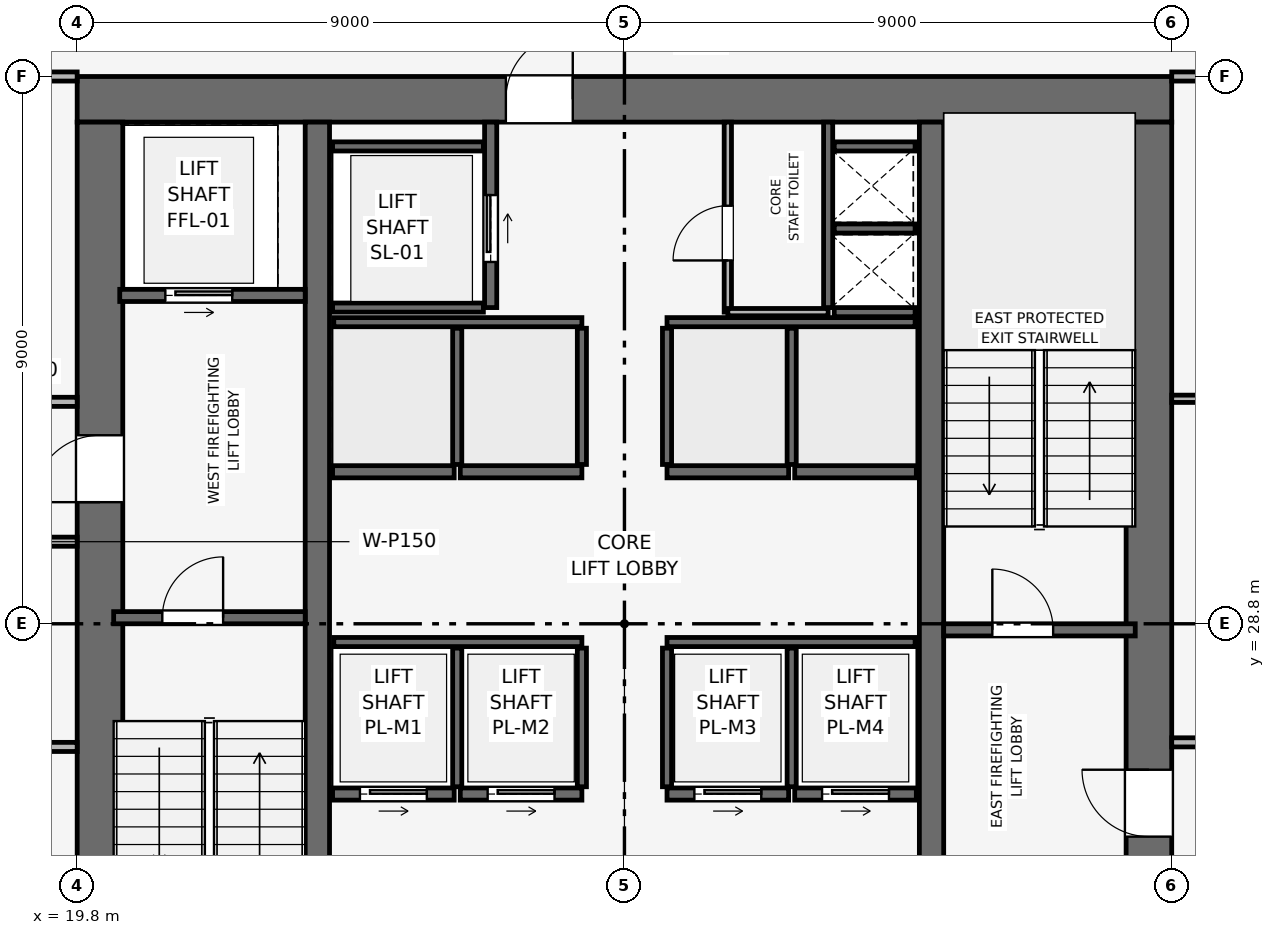
"""IFC4 building model, lengths in metres.
Left out: names, types, materials, properties, quantities, classifications, styles, units other than length and angle.
Written with IfcOpenShell. Run it as: python <this file> out.ifc"""

import sys

from ifc_helpers import new_model, si_unit, direction, frame, frame_2d, origin, place, context, subcontext, project, spatial, rectangle, extrude, element, fill, save


model = new_model("IFC4")
c1 = context("Model", 3, precision=1e-05, world=origin(), true_north=direction((0.0, 1.0)))
c2 = subcontext(c1, "Body", "Model", "MODEL_VIEW")
j1 = project(units=[si_unit("LENGTHUNIT", "METRE"), si_unit("PLANEANGLEUNIT", "RADIAN")], contexts=[c1])
p1 = place(None, origin())
s1 = spatial("IfcSite", under=j1, at=p1, CompositionType="ELEMENT")
p2 = place(p1, origin())
s2 = spatial("IfcBuilding", under=s1, at=p2, CompositionType="ELEMENT")
p3 = place(p2, frame((0.0, 0.0, 207.45)))
s3 = spatial("IfcBuildingStorey", under=s2, at=p3, CompositionType="ELEMENT", Elevation=207.45)
p4 = place(p3, frame((19.8, 37.425, 0.0), z_axis=(0.0, 0.0, 1.0), x_axis=(1.0, 0.0, 0.0)))
e1 = element("IfcWall", 1, at=p4, inside=s3, PredefinedType="SHEAR", context=c2, shape_type="SweptSolid", body=[
    extrude(rectangle(XDim=18.0, YDim=0.75, at=frame_2d((9.0, 0.0))), origin(), (0.0, 0.0, 1.0), 3.75),
])
p5 = place(p4, frame((7.05, 0.0, 0.0)))
e2 = element("IfcOpeningElement", 2, at=p5, cuts=e1, PredefinedType="OPENING", context=c2, shape_type="SweptSolid", body=[
    extrude(rectangle(XDim=1.1, YDim=2.15, at=frame_2d((0.55, 1.075))), frame((0.0, 0.385, 0.0), z_axis=(0.0, -1.0, 0.0), x_axis=(1.0, 0.0, 0.0)), (0.0, 0.0, 1.0), 0.77),
])
p6 = place(p3, frame((20.175, 20.55, 0.0), z_axis=(0.0, 0.0, 1.0), x_axis=(0.0, 1.0, 0.0)))
e3 = element("IfcWall", 3, at=p6, inside=s3, PredefinedType="SHEAR", context=c2, shape_type="SweptSolid", body=[
    extrude(rectangle(XDim=16.5, YDim=0.75, at=frame_2d((8.25, 0.0))), origin(), (0.0, 0.0, 1.0), 3.75),
])
p7 = place(p6, frame((10.25, 0.0, 0.0)))
e4 = element("IfcOpeningElement", 4, at=p7, cuts=e3, PredefinedType="OPENING", context=c2, shape_type="SweptSolid", body=[
    extrude(rectangle(XDim=1.1, YDim=2.15, at=frame_2d((0.55, 1.075))), frame((0.0, 0.385, 0.0), z_axis=(0.0, -1.0, 0.0), x_axis=(1.0, 0.0, 0.0)), (0.0, 0.0, 1.0), 0.77),
])
p8 = place(p3, frame((37.425, 20.55, 0.0), z_axis=(0.0, 0.0, 1.0), x_axis=(0.0, 1.0, 0.0)))
e5 = element("IfcWall", 5, at=p8, inside=s3, PredefinedType="SHEAR", context=c2, shape_type="SweptSolid", body=[
    extrude(rectangle(XDim=16.5, YDim=0.75, at=frame_2d((8.25, 0.0))), origin(), (0.0, 0.0, 1.0), 3.75),
])
p9 = place(p8, frame((4.75, 0.0, 0.0)))
e6 = element("IfcOpeningElement", 6, at=p9, cuts=e5, PredefinedType="OPENING", context=c2, shape_type="SweptSolid", body=[
    extrude(rectangle(XDim=1.1, YDim=2.15, at=frame_2d((0.55, 1.075))), frame((0.0, 0.385, 0.0), z_axis=(0.0, -1.0, 0.0), x_axis=(1.0, 0.0, 0.0)), (0.0, 0.0, 1.0), 0.77),
])
for number, where, z_axis, x_axis in (
    (7, (23.75, 20.55, 0.0), (0.0, 0.0, 1.0), (0.0, 1.0, 0.0)),
    (8, (33.85, 20.55, 0.0), (0.0, 0.0, 1.0), (0.0, 1.0, 0.0)),
):
    element("IfcWall", number, at=place(p3, frame(where, z_axis=z_axis, x_axis=x_axis)), inside=s3, PredefinedType="SHEAR", context=c2, shape_type="SweptSolid", body=[
        extrude(rectangle(XDim=16.5, YDim=0.4, at=frame_2d((8.25, 0.0))), origin(), (0.0, 0.0, 1.0), 3.75),
    ])
p10 = place(p3, frame((20.4, 28.9, 0.0), z_axis=(0.0, 0.0, 1.0), x_axis=(1.0, 0.0, 0.0)))
e9 = element("IfcWall", 9, at=p10, inside=s3, PredefinedType="SHEAR", context=c2, shape_type="SweptSolid", body=[
    extrude(rectangle(XDim=3.15, YDim=0.2, at=frame_2d((1.575, 0.0))), origin(), (0.0, 0.0, 1.0), 3.5),
])
p11 = place(p10, frame((0.8, 0.0, 0.0)))
e10 = element("IfcOpeningElement", 10, at=p11, cuts=e9, PredefinedType="OPENING", context=c2, shape_type="SweptSolid", body=[
    extrude(rectangle(XDim=1.0, YDim=2.1, at=frame_2d((0.5, 1.05))), frame((0.0, 0.11, 0.0), z_axis=(0.0, -1.0, 0.0), x_axis=(1.0, 0.0, 0.0)), (0.0, 0.0, 1.0), 0.22),
])
p12 = place(p3, frame((34.05, 28.7, 0.0), z_axis=(0.0, 0.0, 1.0), x_axis=(1.0, 0.0, 0.0)))
e11 = element("IfcWall", 11, at=p12, inside=s3, PredefinedType="SHEAR", context=c2, shape_type="SweptSolid", body=[
    extrude(rectangle(XDim=3.15, YDim=0.2, at=frame_2d((1.575, 0.0))), origin(), (0.0, 0.0, 1.0), 3.5),
])
p13 = place(p12, frame((0.8, 0.0, 0.0)))
e12 = element("IfcOpeningElement", 12, at=p13, cuts=e11, PredefinedType="OPENING", context=c2, shape_type="SweptSolid", body=[
    extrude(rectangle(XDim=1.0, YDim=2.1, at=frame_2d((0.5, 1.05))), frame((0.0, 0.11, 0.0), z_axis=(0.0, -1.0, 0.0), x_axis=(1.0, 0.0, 0.0)), (0.0, 0.0, 1.0), 0.22),
])
p14 = place(p3, frame((32.15, 34.0, 0.0), z_axis=(0.0, 0.0, 1.0), x_axis=(0.0, 1.0, 0.0)))
e13 = element("IfcWall", 13, at=p14, inside=s3, PredefinedType="SHEAR", context=c2, shape_type="SweptSolid", body=[
    extrude(rectangle(XDim=3.05, YDim=0.15, at=frame_2d((1.525, 0.0))), origin(), (0.0, 0.0, 1.0), 3.5),
])
for number, where, z_axis, x_axis in (
    (14, (32.25, 33.925, 0.0), (0.0, 0.0, 1.0), (1.0, 0.0, 0.0)),
    (15, (32.25, 35.3, 0.0), (0.0, 0.0, 1.0), (1.0, 0.0, 0.0)),
):
    element("IfcWall", number, at=place(p3, frame(where, z_axis=z_axis, x_axis=x_axis)), inside=s3, PredefinedType="SHEAR", context=c2, shape_type="SweptSolid", body=[
        extrude(rectangle(XDim=1.33, YDim=0.15, at=frame_2d((0.665, 0.0))), origin(), (0.0, 0.0, 1.0), 3.5),
    ])
p15 = place(p3, frame((20.5, 34.2, 0.0), z_axis=(0.0, 0.0, 1.0), x_axis=(1.0, 0.0, 0.0)))
e16 = element("IfcWall", 16, at=p15, inside=s3, PredefinedType="SHEAR", context=c2, shape_type="SweptSolid", body=[
    extrude(rectangle(XDim=3.05, YDim=0.2, at=frame_2d((1.525, 0.0))), origin(), (0.0, 0.0, 1.0), 3.5),
])
p16 = place(p15, frame((0.75, 0.0, 0.0)))
e17 = element("IfcOpeningElement", 17, at=p16, cuts=e16, PredefinedType="OPENING", context=c2, shape_type="SweptSolid", body=[
    extrude(rectangle(XDim=1.1, YDim=2.15, at=frame_2d((0.55, 1.075))), frame((0.0, 0.11, 0.0), z_axis=(0.0, -1.0, 0.0), x_axis=(1.0, 0.0, 0.0)), (0.0, 0.0, 1.0), 0.22),
])
p17 = place(p3, frame((26.6, 34.0, 0.0), z_axis=(0.0, 0.0, 1.0), x_axis=(0.0, 1.0, 0.0)))
e18 = element("IfcWall", 18, at=p17, inside=s3, PredefinedType="SHEAR", context=c2, shape_type="SweptSolid", body=[
    extrude(rectangle(XDim=3.05, YDim=0.2, at=frame_2d((1.525, 0.0))), origin(), (0.0, 0.0, 1.0), 3.5),
])
p18 = place(p17, frame((0.75, 0.0, 0.0)))
e19 = element("IfcOpeningElement", 19, at=p18, cuts=e18, PredefinedType="OPENING", context=c2, shape_type="SweptSolid", body=[
    extrude(rectangle(XDim=1.1, YDim=2.15, at=frame_2d((0.55, 1.075))), frame((0.0, 0.11, 0.0), z_axis=(0.0, -1.0, 0.0), x_axis=(1.0, 0.0, 0.0)), (0.0, 0.0, 1.0), 0.22),
])
for number, where, z_axis, x_axis in (
    (20, (24.0, 34.0, 0.0), (0.0, 0.0, 1.0), (1.0, 0.0, 0.0)),
    (21, (24.0, 36.65, 0.0), (0.0, 0.0, 1.0), (1.0, 0.0, 0.0)),
):
    element("IfcWall", number, at=place(p3, frame(where, z_axis=z_axis, x_axis=x_axis)), inside=s3, PredefinedType="SHEAR", context=c2, shape_type="SweptSolid", body=[
        extrude(rectangle(XDim=2.48, YDim=0.15, at=frame_2d((1.24, 0.0))), origin(), (0.0, 0.0, 1.0), 3.5),
    ])
p19 = place(p3, frame((24.0, 26.0, 0.0), z_axis=(0.0, 0.0, 1.0), x_axis=(1.0, 0.0, 0.0)))
e22 = element("IfcWall", 22, at=p19, inside=s3, PredefinedType="SHEAR", context=c2, shape_type="SweptSolid", body=[
    extrude(rectangle(XDim=2.0, YDim=0.2, at=frame_2d((1.0, 0.0))), origin(), (0.0, 0.0, 1.0), 3.5),
])
p20 = place(p19, frame((0.45, 0.0, 0.0)))
e23 = element("IfcOpeningElement", 23, at=p20, cuts=e22, PredefinedType="OPENING", context=c2, shape_type="SweptSolid", body=[
    extrude(rectangle(XDim=1.1, YDim=2.15, at=frame_2d((0.55, 1.075))), frame((0.0, 0.11, 0.0), z_axis=(0.0, -1.0, 0.0), x_axis=(1.0, 0.0, 0.0)), (0.0, 0.0, 1.0), 0.22),
])
p21 = place(p3, frame((26.1, 26.0, 0.0), z_axis=(0.0, 0.0, 1.0), x_axis=(1.0, 0.0, 0.0)))
e24 = element("IfcWall", 24, at=p21, inside=s3, PredefinedType="SHEAR", context=c2, shape_type="SweptSolid", body=[
    extrude(rectangle(XDim=2.0, YDim=0.2, at=frame_2d((1.0, 0.0))), origin(), (0.0, 0.0, 1.0), 3.5),
])
p22 = place(p21, frame((0.45, 0.0, 0.0)))
e25 = element("IfcOpeningElement", 25, at=p22, cuts=e24, PredefinedType="OPENING", context=c2, shape_type="SweptSolid", body=[
    extrude(rectangle(XDim=1.1, YDim=2.15, at=frame_2d((0.55, 1.075))), frame((0.0, 0.11, 0.0), z_axis=(0.0, -1.0, 0.0), x_axis=(1.0, 0.0, 0.0)), (0.0, 0.0, 1.0), 0.22),
])
p23 = place(p3, frame((29.5, 26.0, 0.0), z_axis=(0.0, 0.0, 1.0), x_axis=(1.0, 0.0, 0.0)))
e26 = element("IfcWall", 26, at=p23, inside=s3, PredefinedType="SHEAR", context=c2, shape_type="SweptSolid", body=[
    extrude(rectangle(XDim=2.0, YDim=0.2, at=frame_2d((1.0, 0.0))), origin(), (0.0, 0.0, 1.0), 3.5),
])
p24 = place(p23, frame((0.45, 0.0, 0.0)))
e27 = element("IfcOpeningElement", 27, at=p24, cuts=e26, PredefinedType="OPENING", context=c2, shape_type="SweptSolid", body=[
    extrude(rectangle(XDim=1.1, YDim=2.15, at=frame_2d((0.55, 1.075))), frame((0.0, 0.11, 0.0), z_axis=(0.0, -1.0, 0.0), x_axis=(1.0, 0.0, 0.0)), (0.0, 0.0, 1.0), 0.22),
])
p25 = place(p3, frame((31.6, 26.0, 0.0), z_axis=(0.0, 0.0, 1.0), x_axis=(1.0, 0.0, 0.0)))
e28 = element("IfcWall", 28, at=p25, inside=s3, PredefinedType="SHEAR", context=c2, shape_type="SweptSolid", body=[
    extrude(rectangle(XDim=2.0, YDim=0.2, at=frame_2d((1.0, 0.0))), origin(), (0.0, 0.0, 1.0), 3.5),
])
p26 = place(p25, frame((0.45, 0.0, 0.0)))
e29 = element("IfcOpeningElement", 29, at=p26, cuts=e28, PredefinedType="OPENING", context=c2, shape_type="SweptSolid", body=[
    extrude(rectangle(XDim=1.1, YDim=2.15, at=frame_2d((0.55, 1.075))), frame((0.0, 0.11, 0.0), z_axis=(0.0, -1.0, 0.0), x_axis=(1.0, 0.0, 0.0)), (0.0, 0.0, 1.0), 0.22),
])
for number, where, z_axis, x_axis in (
    (30, (24.0, 31.3, 0.0), (0.0, 0.0, 1.0), (1.0, 0.0, 0.0)),
    (31, (26.1, 31.3, 0.0), (0.0, 0.0, 1.0), (1.0, 0.0, 0.0)),
    (32, (29.5, 31.3, 0.0), (0.0, 0.0, 1.0), (1.0, 0.0, 0.0)),
    (33, (31.6, 31.3, 0.0), (0.0, 0.0, 1.0), (1.0, 0.0, 0.0)),
):
    element("IfcWall", number, at=place(p3, frame(where, z_axis=z_axis, x_axis=x_axis)), inside=s3, PredefinedType="SHEAR", context=c2, shape_type="SweptSolid", body=[
        extrude(rectangle(XDim=2.0, YDim=0.2, at=frame_2d((1.0, 0.0))), origin(), (0.0, 0.0, 1.0), 3.5),
    ])
p27 = place(p3, frame((32.25, 36.65, 0.0), z_axis=(0.0, 0.0, 1.0), x_axis=(1.0, 0.0, 0.0)))
e34 = element("IfcWall", 34, at=p27, inside=s3, PredefinedType="SHEAR", context=c2, shape_type="SweptSolid", body=[
    extrude(rectangle(XDim=1.33, YDim=0.15, at=frame_2d((0.665, 0.0))), origin(), (0.0, 0.0, 1.0), 3.5),
])
for number, where, z_axis, x_axis in (
    (35, (24.02, 28.5, 0.0), (0.0, 0.0, 1.0), (1.0, 0.0, 0.0)),
    (36, (29.5, 28.5, 0.0), (0.0, 0.0, 1.0), (1.0, 0.0, 0.0)),
):
    element("IfcWall", number, at=place(p3, frame(where, z_axis=z_axis, x_axis=x_axis)), inside=s3, PredefinedType="SHEAR", context=c2, shape_type="SweptSolid", body=[
        extrude(rectangle(XDim=4.08, YDim=0.15, at=frame_2d((2.04, 0.0))), origin(), (0.0, 0.0, 1.0), 3.5),
    ])
for number, where, z_axis, x_axis in (
    (37, (26.05, 26.12, 0.0), (0.0, 0.0, 1.0), (0.0, 1.0, 0.0)),
    (38, (28.1, 26.12, 0.0), (0.0, 0.0, 1.0), (0.0, 1.0, 0.0)),
    (39, (29.5, 26.12, 0.0), (0.0, 0.0, 1.0), (0.0, 1.0, 0.0)),
    (40, (31.55, 26.12, 0.0), (0.0, 0.0, 1.0), (0.0, 1.0, 0.0)),
):
    element("IfcWall", number, at=place(p3, frame(where, z_axis=z_axis, x_axis=x_axis)), inside=s3, PredefinedType="SHEAR", context=c2, shape_type="SweptSolid", body=[
        extrude(rectangle(XDim=2.28, YDim=0.15, at=frame_2d((1.14, 0.0))), origin(), (0.0, 0.0, 1.0), 3.5),
    ])
for number, where, z_axis, x_axis in (
    (41, (24.02, 33.76, 0.0), (0.0, 0.0, 1.0), (1.0, 0.0, 0.0)),
    (42, (29.5, 33.76, 0.0), (0.0, 0.0, 1.0), (1.0, 0.0, 0.0)),
):
    element("IfcWall", number, at=place(p3, frame(where, z_axis=z_axis, x_axis=x_axis)), inside=s3, PredefinedType="SHEAR", context=c2, shape_type="SweptSolid", body=[
        extrude(rectangle(XDim=4.08, YDim=0.15, at=frame_2d((2.04, 0.0))), origin(), (0.0, 0.0, 1.0), 3.5),
    ])
for number, where, z_axis, x_axis in (
    (43, (26.05, 31.42, 0.0), (0.0, 0.0, 1.0), (0.0, 1.0, 0.0)),
    (44, (28.1, 31.42, 0.0), (0.0, 0.0, 1.0), (0.0, 1.0, 0.0)),
    (45, (29.5, 31.42, 0.0), (0.0, 0.0, 1.0), (0.0, 1.0, 0.0)),
    (46, (31.55, 31.42, 0.0), (0.0, 0.0, 1.0), (0.0, 1.0, 0.0)),
):
    element("IfcWall", number, at=place(p3, frame(where, z_axis=z_axis, x_axis=x_axis)), inside=s3, PredefinedType="SHEAR", context=c2, shape_type="SweptSolid", body=[
        extrude(rectangle(XDim=2.24, YDim=0.15, at=frame_2d((1.12, 0.0))), origin(), (0.0, 0.0, 1.0), 3.5),
    ])
p28 = place(p3, frame((30.5, 33.925, 0.0), z_axis=(0.0, 0.0, 1.0), x_axis=(0.0, 1.0, 0.0)))
e47 = element("IfcWall", 47, at=p28, inside=s3, PredefinedType="PARTITIONING", context=c2, shape_type="SweptSolid", body=[
    extrude(rectangle(XDim=3.125, YDim=0.12, at=frame_2d((1.562, 0.0))), origin(), (0.0, 0.0, 1.0), 3.5),
])
p29 = place(p28, frame((0.85, 0.0, 0.0)))
e48 = element("IfcOpeningElement", 48, at=p29, cuts=e47, PredefinedType="OPENING", context=c2, shape_type="SweptSolid", body=[
    extrude(rectangle(XDim=0.9, YDim=2.1, at=frame_2d((0.45, 1.05))), frame((0.0, 0.07, 0.0), z_axis=(0.0, -1.0, 0.0), x_axis=(1.0, 0.0, 0.0)), (0.0, 0.0, 1.0), 0.14),
])
p30 = place(p3, frame((30.5, 33.925, 0.0), z_axis=(0.0, 0.0, 1.0), x_axis=(1.0, 0.0, 0.0)))
e49 = element("IfcWall", 49, at=p30, inside=s3, PredefinedType="PARTITIONING", context=c2, shape_type="SweptSolid", body=[
    extrude(rectangle(XDim=1.65, YDim=0.12, at=frame_2d((0.825, 0.0))), origin(), (0.0, 0.0, 1.0), 3.5),
])
for number, where, z_axis, x_axis in (
    (50, (15.4, 26.775, 0.0), (0.0, 0.0, 1.0), (1.0, 0.0, 0.0)),
    (51, (15.4, 30.15, 0.0), (0.0, 0.0, 1.0), (1.0, 0.0, 0.0)),
    (52, (15.4, 32.45, 0.0), (0.0, 0.0, 1.0), (1.0, 0.0, 0.0)),
):
    element("IfcWall", number, at=place(p3, frame(where, z_axis=z_axis, x_axis=x_axis)), inside=s3, PredefinedType="PARTITIONING", context=c2, shape_type="SweptSolid", body=[
        extrude(rectangle(XDim=4.4, YDim=0.15, at=frame_2d((2.2, 0.0))), origin(), (0.0, 0.0, 1.0), 3.5),
    ])
p31 = place(p3, frame((15.4, 37.8, 0.0), z_axis=(0.0, 0.0, 1.0), x_axis=(1.0, 0.0, 0.0)))
e53 = element("IfcWall", 53, at=p31, inside=s3, PredefinedType="PARTITIONING", context=c2, shape_type="SweptSolid", body=[
    extrude(rectangle(XDim=4.4, YDim=0.15, at=frame_2d((2.2, 0.0))), origin(), (0.0, 0.0, 1.0), 3.035),
])
p32 = place(p3, frame((37.8, 26.85, 0.0), z_axis=(0.0, 0.0, 1.0), x_axis=(1.0, 0.0, 0.0)))
e54 = element("IfcWall", 54, at=p32, inside=s3, PredefinedType="PARTITIONING", context=c2, shape_type="SweptSolid", body=[
    extrude(rectangle(XDim=2.25, YDim=0.15, at=frame_2d((1.125, 0.0))), origin(), (0.0, 0.0, 1.0), 3.5),
])
p33 = place(p3, frame((37.8, 32.5, 0.0), z_axis=(0.0, 0.0, 1.0), x_axis=(1.0, 0.0, 0.0)))
e55 = element("IfcWall", 55, at=p33, inside=s3, PredefinedType="PARTITIONING", context=c2, shape_type="SweptSolid", body=[
    extrude(rectangle(XDim=17.87, YDim=0.12, at=frame_2d((8.935, 0.0))), origin(), (0.0, 0.0, 1.0), 2.885),
])
p34 = place(p3, frame((37.8, 37.8, 0.0), z_axis=(0.0, 0.0, 1.0), x_axis=(1.0, 0.0, 0.0)))
e56 = element("IfcWall", 56, at=p34, inside=s3, PredefinedType="PARTITIONING", context=c2, shape_type="SweptSolid", body=[
    extrude(rectangle(XDim=17.87, YDim=0.15, at=frame_2d((8.935, 0.0))), origin(), (0.0, 0.0, 1.0), 2.885),
])
p35 = place(p34, frame((3.4, 0.0, 0.0)))
e57 = element("IfcOpeningElement", 57, at=p35, cuts=e56, PredefinedType="OPENING", context=c2, shape_type="SweptSolid", body=[
    extrude(rectangle(XDim=0.9, YDim=2.1, at=frame_2d((0.45, 1.05))), frame((0.0, 0.085, 0.0), z_axis=(0.0, -1.0, 0.0), x_axis=(1.0, 0.0, 0.0)), (0.0, 0.0, 1.0), 0.17),
])
p36 = place(p11, origin())
e58 = element("IfcDoor", 58, at=p36, inside=s3, OperationType="SINGLE_SWING_RIGHT", PredefinedType="DOOR", context=c2, shape_type="SweptSolid", body=[
    extrude(rectangle(XDim=1.0, YDim=2.1, at=frame_2d((0.5, 1.05))), frame((0.0, 0.025, 0.0), z_axis=(0.0, -1.0, 0.0), x_axis=(1.0, 0.0, 0.0)), (0.0, 0.0, 1.0), 0.05),
])
fill(e10, e58)
p37 = place(p13, origin())
e59 = element("IfcDoor", 59, at=p37, inside=s3, OperationType="SINGLE_SWING_LEFT", PredefinedType="DOOR", context=c2, shape_type="SweptSolid", body=[
    extrude(rectangle(XDim=1.0, YDim=2.1, at=frame_2d((0.5, 1.05))), frame((0.0, 0.025, 0.0), z_axis=(0.0, -1.0, 0.0), x_axis=(1.0, 0.0, 0.0)), (0.0, 0.0, 1.0), 0.05),
])
fill(e12, e59)
p38 = place(p16, origin())
e60 = element("IfcDoor", 60, at=p38, inside=s3, OperationType="SLIDING_TO_RIGHT", PredefinedType="DOOR", context=c2, shape_type="SweptSolid", body=[
    extrude(rectangle(XDim=1.1, YDim=2.15, at=frame_2d((0.55, 1.075))), frame((0.0, 0.025, 0.0), z_axis=(0.0, -1.0, 0.0), x_axis=(1.0, 0.0, 0.0)), (0.0, 0.0, 1.0), 0.05),
])
fill(e17, e60)
p39 = place(p18, origin())
e61 = element("IfcDoor", 61, at=p39, inside=s3, OperationType="SLIDING_TO_RIGHT", PredefinedType="DOOR", context=c2, shape_type="SweptSolid", body=[
    extrude(rectangle(XDim=1.1, YDim=2.15, at=frame_2d((0.55, 1.075))), frame((0.0, 0.025, 0.0), z_axis=(0.0, -1.0, 0.0), x_axis=(1.0, 0.0, 0.0)), (0.0, 0.0, 1.0), 0.05),
])
fill(e19, e61)
p40 = place(p20, origin())
e62 = element("IfcDoor", 62, at=p40, inside=s3, OperationType="SLIDING_TO_RIGHT", PredefinedType="DOOR", context=c2, shape_type="SweptSolid", body=[
    extrude(rectangle(XDim=1.1, YDim=2.15, at=frame_2d((0.55, 1.075))), frame((0.0, 0.025, 0.0), z_axis=(0.0, -1.0, 0.0), x_axis=(1.0, 0.0, 0.0)), (0.0, 0.0, 1.0), 0.05),
])
fill(e23, e62)
p41 = place(p22, origin())
e63 = element("IfcDoor", 63, at=p41, inside=s3, OperationType="SLIDING_TO_RIGHT", PredefinedType="DOOR", context=c2, shape_type="SweptSolid", body=[
    extrude(rectangle(XDim=1.1, YDim=2.15, at=frame_2d((0.55, 1.075))), frame((0.0, 0.025, 0.0), z_axis=(0.0, -1.0, 0.0), x_axis=(1.0, 0.0, 0.0)), (0.0, 0.0, 1.0), 0.05),
])
fill(e25, e63)
p42 = place(p24, origin())
e64 = element("IfcDoor", 64, at=p42, inside=s3, OperationType="SLIDING_TO_RIGHT", PredefinedType="DOOR", context=c2, shape_type="SweptSolid", body=[
    extrude(rectangle(XDim=1.1, YDim=2.15, at=frame_2d((0.55, 1.075))), frame((0.0, 0.025, 0.0), z_axis=(0.0, -1.0, 0.0), x_axis=(1.0, 0.0, 0.0)), (0.0, 0.0, 1.0), 0.05),
])
fill(e27, e64)
p43 = place(p26, origin())
e65 = element("IfcDoor", 65, at=p43, inside=s3, OperationType="SLIDING_TO_RIGHT", PredefinedType="DOOR", context=c2, shape_type="SweptSolid", body=[
    extrude(rectangle(XDim=1.1, YDim=2.15, at=frame_2d((0.55, 1.075))), frame((0.0, 0.025, 0.0), z_axis=(0.0, -1.0, 0.0), x_axis=(1.0, 0.0, 0.0)), (0.0, 0.0, 1.0), 0.05),
])
fill(e29, e65)
p44 = place(p29, origin())
e66 = element("IfcDoor", 66, at=p44, inside=s3, OperationType="SINGLE_SWING_LEFT", PredefinedType="DOOR", context=c2, shape_type="SweptSolid", body=[
    extrude(rectangle(XDim=0.9, YDim=2.1, at=frame_2d((0.45, 1.05))), frame((0.0, 0.025, 0.0), z_axis=(0.0, -1.0, 0.0), x_axis=(1.0, 0.0, 0.0)), (0.0, 0.0, 1.0), 0.05),
])
fill(e48, e66)
p45 = place(p7, origin())
e67 = element("IfcDoor", 67, at=p45, inside=s3, OperationType="SINGLE_SWING_LEFT", PredefinedType="DOOR", context=c2, shape_type="SweptSolid", body=[
    extrude(rectangle(XDim=1.1, YDim=2.15, at=frame_2d((0.55, 1.075))), frame((0.0, 0.025, 0.0), z_axis=(0.0, -1.0, 0.0), x_axis=(1.0, 0.0, 0.0)), (0.0, 0.0, 1.0), 0.05),
])
fill(e4, e67)
p46 = place(p9, origin())
e68 = element("IfcDoor", 68, at=p46, inside=s3, OperationType="SINGLE_SWING_RIGHT", PredefinedType="DOOR", context=c2, shape_type="SweptSolid", body=[
    extrude(rectangle(XDim=1.1, YDim=2.15, at=frame_2d((0.55, 1.075))), frame((0.0, 0.025, 0.0), z_axis=(0.0, -1.0, 0.0), x_axis=(1.0, 0.0, 0.0)), (0.0, 0.0, 1.0), 0.05),
])
fill(e6, e68)
p47 = place(p5, origin())
e69 = element("IfcDoor", 69, at=p47, inside=s3, OperationType="SINGLE_SWING_RIGHT", PredefinedType="DOOR", context=c2, shape_type="SweptSolid", body=[
    extrude(rectangle(XDim=1.1, YDim=2.15, at=frame_2d((0.55, 1.075))), frame((0.0, 0.025, 0.0), z_axis=(0.0, -1.0, 0.0), x_axis=(1.0, 0.0, 0.0)), (0.0, 0.0, 1.0), 0.05),
])
fill(e2, e69)
save(model, sys.argv[1])
